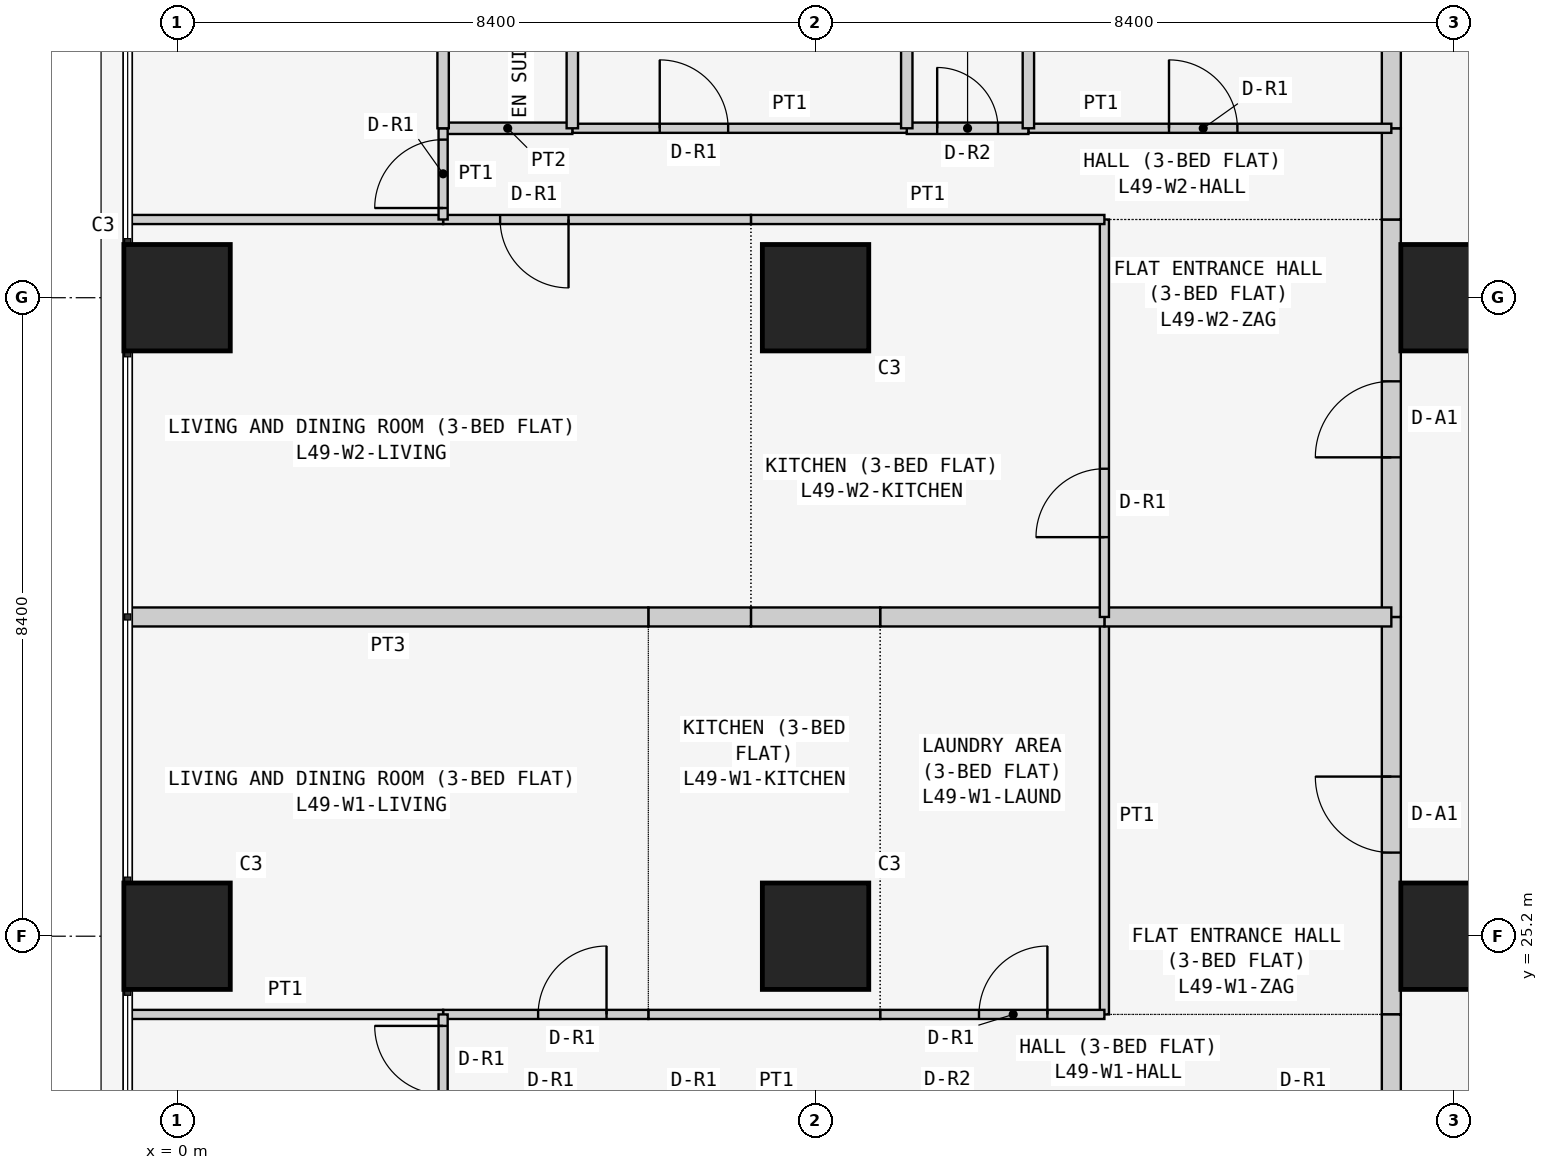
"""IFC4 building model, lengths in metres.
Left out: names, types, materials, properties, quantities, classifications, styles, units other than length and angle.
Written with IfcOpenShell. Run it as: python <this file> out.ifc"""

import sys

from ifc_helpers import new_model, si_unit, direction, frame, frame_2d, origin, origin_2d, place, context, subcontext, project, spatial, rectangle, extrude, element, fill, save


model = new_model("IFC4")
c1 = context("Model", 3, precision=1e-05, world=origin(), true_north=direction((0.0, 1.0)))
c2 = subcontext(c1, "Body", "Model", "MODEL_VIEW")
j1 = project(units=[si_unit("LENGTHUNIT", "METRE"), si_unit("PLANEANGLEUNIT", "RADIAN")], contexts=[c1])
p1 = place(None, origin())
s1 = spatial("IfcSite", under=j1, at=p1, CompositionType="ELEMENT")
p2 = place(p1, origin())
s2 = spatial("IfcBuilding", under=s1, at=p2, CompositionType="ELEMENT")
p3 = place(p2, frame((0.0, 0.0, 190.5)))
s3 = spatial("IfcBuildingStorey", under=s2, at=p3, CompositionType="ELEMENT", Elevation=190.5)
for number, where, z_axis, x_axis in (
    (1, (0.0, 25.2, 0.0), (0.0, 0.0, 1.0), (1.0, 0.0, 0.0)),
    (2, (0.0, 33.6, 0.0), (0.0, 0.0, 1.0), (1.0, 0.0, 0.0)),
    (3, (8.4, 25.2, 0.0), (0.0, 0.0, 1.0), (1.0, 0.0, 0.0)),
    (4, (8.4, 33.6, 0.0), (0.0, 0.0, 1.0), (1.0, 0.0, 0.0)),
    (5, (16.8, 25.2, 0.0), (0.0, 0.0, 1.0), (1.0, 0.0, 0.0)),
    (6, (16.8, 33.6, 0.0), (0.0, 0.0, 1.0), (1.0, 0.0, 0.0)),
):
    element("IfcColumn", number, at=place(p3, frame(where, z_axis=z_axis, x_axis=x_axis)), inside=s3, PredefinedType="COLUMN", context=c2, shape_type="SweptSolid", body=[
        extrude(rectangle(XDim=1.4, YDim=1.4, at=origin_2d()), origin(), (0.0, 0.0, 1.0), 3.6),
    ])
p4 = place(p3, frame((15.975, 24.171, 0.0), z_axis=(0.0, 0.0, 1.0), x_axis=(0.0, 1.0, 0.0)))
e7 = element("IfcWall", 7, at=p4, inside=s3, PredefinedType="PARTITIONING", context=c2, shape_type="SweptSolid", body=[
    extrude(rectangle(XDim=5.229, YDim=0.25, at=frame_2d((2.615, 0.0))), origin(), (0.0, 0.0, 1.0), 3.45),
])
p5 = place(p4, frame((2.129, 0.0, 0.0)))
e8 = element("IfcOpeningElement", 8, at=p5, cuts=e7, PredefinedType="OPENING", context=c2, shape_type="SweptSolid", body=[
    extrude(rectangle(XDim=1.0, YDim=2.1, at=frame_2d((0.5, 1.05))), frame((0.0, 0.135, 0.0), z_axis=(0.0, -1.0, 0.0), x_axis=(1.0, 0.0, 0.0)), (0.0, 0.0, 1.0), 0.27),
])
p6 = place(p3, frame((15.975, 22.971, 0.0), z_axis=(0.0, 0.0, 1.0), x_axis=(0.0, 1.0, 0.0)))
e9 = element("IfcWall", 9, at=p6, inside=s3, PredefinedType="PARTITIONING", context=c2, shape_type="SweptSolid", body=[
    extrude(rectangle(XDim=1.2, YDim=0.25, at=frame_2d((0.6, 0.0))), origin(), (0.0, 0.0, 1.0), 3.45),
])
p7 = place(p3, frame((15.975, 29.4, 0.0), z_axis=(0.0, 0.0, 1.0), x_axis=(0.0, 1.0, 0.0)))
e10 = element("IfcWall", 10, at=p7, inside=s3, PredefinedType="PARTITIONING", context=c2, shape_type="SweptSolid", body=[
    extrude(rectangle(XDim=5.229, YDim=0.25, at=frame_2d((2.615, 0.0))), origin(), (0.0, 0.0, 1.0), 3.45),
])
p8 = place(p7, frame((2.1, 0.0, 0.0)))
e11 = element("IfcOpeningElement", 11, at=p8, cuts=e10, PredefinedType="OPENING", context=c2, shape_type="SweptSolid", body=[
    extrude(rectangle(XDim=1.0, YDim=2.1, at=frame_2d((0.5, 1.05))), frame((0.0, 0.135, 0.0), z_axis=(0.0, -1.0, 0.0), x_axis=(1.0, 0.0, 0.0)), (0.0, 0.0, 1.0), 0.27),
])
p9 = place(p3, frame((15.975, 34.629, 0.0), z_axis=(0.0, 0.0, 1.0), x_axis=(0.0, 1.0, 0.0)))
e12 = element("IfcWall", 12, at=p9, inside=s3, PredefinedType="PARTITIONING", context=c2, shape_type="SweptSolid", body=[
    extrude(rectangle(XDim=1.2, YDim=0.25, at=frame_2d((0.6, 0.0))), origin(), (0.0, 0.0, 1.0), 3.45),
])
p10 = place(p3, frame((15.975, 35.829, 0.0), z_axis=(0.0, 0.0, 1.0), x_axis=(0.0, 1.0, 0.0)))
e13 = element("IfcWall", 13, at=p10, inside=s3, PredefinedType="PARTITIONING", context=c2, shape_type="SweptSolid", body=[
    extrude(rectangle(XDim=6.871, YDim=0.25, at=frame_2d((3.436, 0.0))), origin(), (0.0, 0.0, 1.0), 3.45),
])
p11 = place(p3, frame((12.2, 29.4, 0.0), z_axis=(0.0, 0.0, 1.0), x_axis=(0.0, -1.0, 0.0)))
e14 = element("IfcWall", 14, at=p11, inside=s3, PredefinedType="PARTITIONING", context=c2, shape_type="SweptSolid", body=[
    extrude(rectangle(XDim=5.229, YDim=0.12, at=frame_2d((2.615, 0.0))), origin(), (0.0, 0.0, 1.0), 3.45),
])
p12 = place(p3, frame((15.975, 29.4, 0.0), z_axis=(0.0, 0.0, 1.0), x_axis=(-1.0, 0.0, 0.0)))
e15 = element("IfcWall", 15, at=p12, inside=s3, PredefinedType="PARTITIONING", context=c2, shape_type="SweptSolid", body=[
    extrude(rectangle(XDim=3.775, YDim=0.25, at=frame_2d((1.888, 0.0))), origin(), (0.0, 0.0, 1.0), 3.45),
])
p13 = place(p3, frame((9.25, 24.171, 0.0), z_axis=(0.0, 0.0, 1.0), x_axis=(1.0, 0.0, 0.0)))
e16 = element("IfcWall", 16, at=p13, inside=s3, PredefinedType="PARTITIONING", context=c2, shape_type="SweptSolid", body=[
    extrude(rectangle(XDim=2.95, YDim=0.12, at=frame_2d((1.475, 0.0))), origin(), (0.0, 0.0, 1.0), 3.45),
])
p14 = place(p13, frame((1.3, 0.0, 0.0)))
e17 = element("IfcOpeningElement", 17, at=p14, cuts=e16, PredefinedType="OPENING", context=c2, shape_type="SweptSolid", body=[
    extrude(rectangle(XDim=0.9, YDim=2.1, at=frame_2d((0.45, 1.05))), frame((0.0, 0.07, 0.0), z_axis=(0.0, -1.0, 0.0), x_axis=(1.0, 0.0, 0.0)), (0.0, 0.0, 1.0), 0.14),
])
p15 = place(p3, frame((12.2, 29.4, 0.0), z_axis=(0.0, 0.0, 1.0), x_axis=(-1.0, 0.0, 0.0)))
e18 = element("IfcWall", 18, at=p15, inside=s3, PredefinedType="PARTITIONING", context=c2, shape_type="SweptSolid", body=[
    extrude(rectangle(XDim=2.95, YDim=0.25, at=frame_2d((1.475, 0.0))), origin(), (0.0, 0.0, 1.0), 3.45),
])
p16 = place(p3, frame((6.2, 24.171, 0.0), z_axis=(0.0, 0.0, 1.0), x_axis=(1.0, 0.0, 0.0)))
e19 = element("IfcWall", 19, at=p16, inside=s3, PredefinedType="PARTITIONING", context=c2, shape_type="SweptSolid", body=[
    extrude(rectangle(XDim=3.05, YDim=0.12, at=frame_2d((1.525, 0.0))), origin(), (0.0, 0.0, 1.0), 3.45),
])
p17 = place(p3, frame((9.25, 29.4, 0.0), z_axis=(0.0, 0.0, 1.0), x_axis=(-1.0, 0.0, 0.0)))
e20 = element("IfcWall", 20, at=p17, inside=s3, PredefinedType="PARTITIONING", context=c2, shape_type="SweptSolid", body=[
    extrude(rectangle(XDim=1.7, YDim=0.25, at=frame_2d((0.85, 0.0))), origin(), (0.0, 0.0, 1.0), 3.45),
])
p18 = place(p3, frame((7.55, 29.4, 0.0), z_axis=(0.0, 0.0, 1.0), x_axis=(-1.0, 0.0, 0.0)))
e21 = element("IfcWall", 21, at=p18, inside=s3, PredefinedType="PARTITIONING", context=c2, shape_type="SweptSolid", body=[
    extrude(rectangle(XDim=1.35, YDim=0.25, at=frame_2d((0.675, 0.0))), origin(), (0.0, 0.0, 1.0), 3.45),
])
p19 = place(p3, frame((3.5, 24.171, 0.0), z_axis=(0.0, 0.0, 1.0), x_axis=(1.0, 0.0, 0.0)))
e22 = element("IfcWall", 22, at=p19, inside=s3, PredefinedType="PARTITIONING", context=c2, shape_type="SweptSolid", body=[
    extrude(rectangle(XDim=2.7, YDim=0.12, at=frame_2d((1.35, 0.0))), origin(), (0.0, 0.0, 1.0), 3.45),
])
p20 = place(p19, frame((1.25, 0.0, 0.0)))
e23 = element("IfcOpeningElement", 23, at=p20, cuts=e22, PredefinedType="OPENING", context=c2, shape_type="SweptSolid", body=[
    extrude(rectangle(XDim=0.9, YDim=2.1, at=frame_2d((0.45, 1.05))), frame((0.0, 0.07, 0.0), z_axis=(0.0, -1.0, 0.0), x_axis=(1.0, 0.0, 0.0)), (0.0, 0.0, 1.0), 0.14),
])
p21 = place(p3, frame((-0.65, 24.171, 0.0), z_axis=(0.0, 0.0, 1.0), x_axis=(1.0, 0.0, 0.0)))
e24 = element("IfcWall", 24, at=p21, inside=s3, PredefinedType="PARTITIONING", context=c2, shape_type="SweptSolid", body=[
    extrude(rectangle(XDim=4.15, YDim=0.12, at=frame_2d((2.075, 0.0))), origin(), (0.0, 0.0, 1.0), 3.45),
])
p22 = place(p3, frame((6.2, 29.4, 0.0), z_axis=(0.0, 0.0, 1.0), x_axis=(-1.0, 0.0, 0.0)))
e25 = element("IfcWall", 25, at=p22, inside=s3, PredefinedType="PARTITIONING", context=c2, shape_type="SweptSolid", body=[
    extrude(rectangle(XDim=6.85, YDim=0.25, at=frame_2d((3.425, 0.0))), origin(), (0.0, 0.0, 1.0), 3.45),
])
p23 = place(p3, frame((3.5, 24.171, 0.0), z_axis=(0.0, 0.0, 1.0), x_axis=(0.0, -1.0, 0.0)))
e26 = element("IfcWall", 26, at=p23, inside=s3, PredefinedType="PARTITIONING", context=c2, shape_type="SweptSolid", body=[
    extrude(rectangle(XDim=1.2, YDim=0.12, at=frame_2d((0.6, 0.0))), origin(), (0.0, 0.0, 1.0), 3.45),
])
p24 = place(p23, frame((0.151, 0.0, 0.0)))
e27 = element("IfcOpeningElement", 27, at=p24, cuts=e26, PredefinedType="OPENING", context=c2, shape_type="SweptSolid", body=[
    extrude(rectangle(XDim=0.9, YDim=2.1, at=frame_2d((0.45, 1.05))), frame((0.0, 0.07, 0.0), z_axis=(0.0, -1.0, 0.0), x_axis=(1.0, 0.0, 0.0)), (0.0, 0.0, 1.0), 0.14),
])
p25 = place(p3, frame((12.2, 29.4, 0.0), z_axis=(0.0, 0.0, 1.0), x_axis=(0.0, 1.0, 0.0)))
e28 = element("IfcWall", 28, at=p25, inside=s3, PredefinedType="PARTITIONING", context=c2, shape_type="SweptSolid", body=[
    extrude(rectangle(XDim=5.229, YDim=0.12, at=frame_2d((2.615, 0.0))), origin(), (0.0, 0.0, 1.0), 3.45),
])
p26 = place(p25, frame((1.05, 0.0, 0.0)))
e29 = element("IfcOpeningElement", 29, at=p26, cuts=e28, PredefinedType="OPENING", context=c2, shape_type="SweptSolid", body=[
    extrude(rectangle(XDim=0.9, YDim=2.1, at=frame_2d((0.45, 1.05))), frame((0.0, 0.07, 0.0), z_axis=(0.0, -1.0, 0.0), x_axis=(1.0, 0.0, 0.0)), (0.0, 0.0, 1.0), 0.14),
])
p27 = place(p3, frame((7.55, 34.629, 0.0), z_axis=(0.0, 0.0, 1.0), x_axis=(1.0, 0.0, 0.0)))
e30 = element("IfcWall", 30, at=p27, inside=s3, PredefinedType="PARTITIONING", context=c2, shape_type="SweptSolid", body=[
    extrude(rectangle(XDim=4.65, YDim=0.12, at=frame_2d((2.325, 0.0))), origin(), (0.0, 0.0, 1.0), 3.45),
])
p28 = place(p3, frame((3.5, 34.629, 0.0), z_axis=(0.0, 0.0, 1.0), x_axis=(1.0, 0.0, 0.0)))
e31 = element("IfcWall", 31, at=p28, inside=s3, PredefinedType="PARTITIONING", context=c2, shape_type="SweptSolid", body=[
    extrude(rectangle(XDim=4.05, YDim=0.12, at=frame_2d((2.025, 0.0))), origin(), (0.0, 0.0, 1.0), 3.45),
])
p29 = place(p28, frame((0.75, 0.0, 0.0)))
e32 = element("IfcOpeningElement", 32, at=p29, cuts=e31, PredefinedType="OPENING", context=c2, shape_type="SweptSolid", body=[
    extrude(rectangle(XDim=0.9, YDim=2.1, at=frame_2d((0.45, 1.05))), frame((0.0, 0.07, 0.0), z_axis=(0.0, -1.0, 0.0), x_axis=(1.0, 0.0, 0.0)), (0.0, 0.0, 1.0), 0.14),
])
p30 = place(p3, frame((-0.65, 34.629, 0.0), z_axis=(0.0, 0.0, 1.0), x_axis=(1.0, 0.0, 0.0)))
e33 = element("IfcWall", 33, at=p30, inside=s3, PredefinedType="PARTITIONING", context=c2, shape_type="SweptSolid", body=[
    extrude(rectangle(XDim=4.15, YDim=0.12, at=frame_2d((2.075, 0.0))), origin(), (0.0, 0.0, 1.0), 3.45),
])
p31 = place(p3, frame((11.2, 35.829, 0.0), z_axis=(0.0, 0.0, 1.0), x_axis=(1.0, 0.0, 0.0)))
e34 = element("IfcWall", 34, at=p31, inside=s3, PredefinedType="PARTITIONING", context=c2, shape_type="SweptSolid", body=[
    extrude(rectangle(XDim=4.775, YDim=0.12, at=frame_2d((2.388, 0.0))), origin(), (0.0, 0.0, 1.0), 3.45),
])
p32 = place(p31, frame((1.85, 0.0, 0.0)))
e35 = element("IfcOpeningElement", 35, at=p32, cuts=e34, PredefinedType="OPENING", context=c2, shape_type="SweptSolid", body=[
    extrude(rectangle(XDim=0.9, YDim=2.1, at=frame_2d((0.45, 1.05))), frame((0.0, 0.07, 0.0), z_axis=(0.0, -1.0, 0.0), x_axis=(1.0, 0.0, 0.0)), (0.0, 0.0, 1.0), 0.14),
])
p33 = place(p3, frame((9.6, 35.829, 0.0), z_axis=(0.0, 0.0, 1.0), x_axis=(1.0, 0.0, 0.0)))
e36 = element("IfcWall", 36, at=p33, inside=s3, PredefinedType="PARTITIONING", context=c2, shape_type="SweptSolid", body=[
    extrude(rectangle(XDim=1.6, YDim=0.15, at=frame_2d((0.8, 0.0))), origin(), (0.0, 0.0, 1.0), 3.45),
])
p34 = place(p33, frame((0.4, 0.0, 0.0)))
e37 = element("IfcOpeningElement", 37, at=p34, cuts=e36, PredefinedType="OPENING", context=c2, shape_type="SweptSolid", body=[
    extrude(rectangle(XDim=0.8, YDim=2.1, at=frame_2d((0.4, 1.05))), frame((0.0, 0.085, 0.0), z_axis=(0.0, -1.0, 0.0), x_axis=(1.0, 0.0, 0.0)), (0.0, 0.0, 1.0), 0.17),
])
p35 = place(p3, frame((5.2, 35.829, 0.0), z_axis=(0.0, 0.0, 1.0), x_axis=(1.0, 0.0, 0.0)))
e38 = element("IfcWall", 38, at=p35, inside=s3, PredefinedType="PARTITIONING", context=c2, shape_type="SweptSolid", body=[
    extrude(rectangle(XDim=4.4, YDim=0.12, at=frame_2d((2.2, 0.0))), origin(), (0.0, 0.0, 1.0), 3.45),
])
p36 = place(p35, frame((1.15, 0.0, 0.0)))
e39 = element("IfcOpeningElement", 39, at=p36, cuts=e38, PredefinedType="OPENING", context=c2, shape_type="SweptSolid", body=[
    extrude(rectangle(XDim=0.9, YDim=2.1, at=frame_2d((0.45, 1.05))), frame((0.0, 0.07, 0.0), z_axis=(0.0, -1.0, 0.0), x_axis=(1.0, 0.0, 0.0)), (0.0, 0.0, 1.0), 0.14),
])
p37 = place(p3, frame((3.5, 35.829, 0.0), z_axis=(0.0, 0.0, 1.0), x_axis=(1.0, 0.0, 0.0)))
e40 = element("IfcWall", 40, at=p37, inside=s3, PredefinedType="PARTITIONING", context=c2, shape_type="SweptSolid", body=[
    extrude(rectangle(XDim=1.7, YDim=0.15, at=frame_2d((0.85, 0.0))), origin(), (0.0, 0.0, 1.0), 3.45),
])
p38 = place(p3, frame((3.5, 34.629, 0.0), z_axis=(0.0, 0.0, 1.0), x_axis=(0.0, 1.0, 0.0)))
e41 = element("IfcWall", 41, at=p38, inside=s3, PredefinedType="PARTITIONING", context=c2, shape_type="SweptSolid", body=[
    extrude(rectangle(XDim=1.2, YDim=0.12, at=frame_2d((0.6, 0.0))), origin(), (0.0, 0.0, 1.0), 3.45),
])
p39 = place(p38, frame((0.151, 0.0, 0.0)))
e42 = element("IfcOpeningElement", 42, at=p39, cuts=e41, PredefinedType="OPENING", context=c2, shape_type="SweptSolid", body=[
    extrude(rectangle(XDim=0.9, YDim=2.1, at=frame_2d((0.45, 1.05))), frame((0.0, 0.07, 0.0), z_axis=(0.0, -1.0, 0.0), x_axis=(1.0, 0.0, 0.0)), (0.0, 0.0, 1.0), 0.14),
])
for number, where, z_axis, x_axis in (
    (43, (11.2, 35.829, 0.0), (0.0, 0.0, 1.0), (0.0, 1.0, 0.0)),
    (44, (9.6, 35.829, 0.0), (0.0, 0.0, 1.0), (0.0, 1.0, 0.0)),
    (45, (5.2, 35.829, 0.0), (0.0, 0.0, 1.0), (0.0, 1.0, 0.0)),
):
    element("IfcWall", number, at=place(p3, frame(where, z_axis=z_axis, x_axis=x_axis)), inside=s3, PredefinedType="PARTITIONING", context=c2, shape_type="SweptSolid", body=[
        extrude(rectangle(XDim=6.871, YDim=0.15, at=frame_2d((3.436, 0.0))), origin(), (0.0, 0.0, 1.0), 3.45),
    ])
p40 = place(p3, frame((3.5, 35.829, 0.0), z_axis=(0.0, 0.0, 1.0), x_axis=(0.0, 1.0, 0.0)))
e46 = element("IfcWall", 46, at=p40, inside=s3, PredefinedType="PARTITIONING", context=c2, shape_type="SweptSolid", body=[
    extrude(rectangle(XDim=6.871, YDim=0.15, at=frame_2d((3.436, 0.0))), origin(), (0.0, 0.0, 1.0), 3.45),
])
p41 = place(p40, frame((3.171, 0.0, 0.0)))
e47 = element("IfcOpeningElement", 47, at=p41, cuts=e46, PredefinedType="OPENING", context=c2, shape_type="SweptSolid", body=[
    extrude(rectangle(XDim=0.8, YDim=2.1, at=frame_2d((0.4, 1.05))), frame((0.0, 0.085, 0.0), z_axis=(0.0, -1.0, 0.0), x_axis=(1.0, 0.0, 0.0)), (0.0, 0.0, 1.0), 0.17),
])
p42 = place(p5, origin())
e48 = element("IfcDoor", 48, at=p42, inside=s3, OperationType="SINGLE_SWING_RIGHT", PredefinedType="DOOR", context=c2, shape_type="SweptSolid", body=[
    extrude(rectangle(XDim=1.0, YDim=2.1, at=frame_2d((0.5, 1.05))), frame((0.0, 0.025, 0.0), z_axis=(0.0, -1.0, 0.0), x_axis=(1.0, 0.0, 0.0)), (0.0, 0.0, 1.0), 0.05),
])
fill(e8, e48)
p43 = place(p14, origin())
e49 = element("IfcDoor", 49, at=p43, inside=s3, OperationType="SINGLE_SWING_RIGHT", PredefinedType="DOOR", context=c2, shape_type="SweptSolid", body=[
    extrude(rectangle(XDim=0.9, YDim=2.1, at=frame_2d((0.45, 1.05))), frame((0.0, 0.025, 0.0), z_axis=(0.0, -1.0, 0.0), x_axis=(1.0, 0.0, 0.0)), (0.0, 0.0, 1.0), 0.05),
])
fill(e17, e49)
p44 = place(p20, origin())
e50 = element("IfcDoor", 50, at=p44, inside=s3, OperationType="SINGLE_SWING_RIGHT", PredefinedType="DOOR", context=c2, shape_type="SweptSolid", body=[
    extrude(rectangle(XDim=0.9, YDim=2.1, at=frame_2d((0.45, 1.05))), frame((0.0, 0.025, 0.0), z_axis=(0.0, -1.0, 0.0), x_axis=(1.0, 0.0, 0.0)), (0.0, 0.0, 1.0), 0.05),
])
fill(e23, e50)
p45 = place(p24, frame((0.9, 0.0, 0.0), z_axis=(0.0, 0.0, 1.0), x_axis=(-1.0, 0.0, 0.0)))
e51 = element("IfcDoor", 51, at=p45, inside=s3, OperationType="SINGLE_SWING_RIGHT", PredefinedType="DOOR", context=c2, shape_type="SweptSolid", body=[
    extrude(rectangle(XDim=0.9, YDim=2.1, at=frame_2d((0.45, 1.05))), frame((0.0, 0.025, 0.0), z_axis=(0.0, -1.0, 0.0), x_axis=(1.0, 0.0, 0.0)), (0.0, 0.0, 1.0), 0.05),
])
fill(e27, e51)
p46 = place(p8, origin())
e52 = element("IfcDoor", 52, at=p46, inside=s3, OperationType="SINGLE_SWING_LEFT", PredefinedType="DOOR", context=c2, shape_type="SweptSolid", body=[
    extrude(rectangle(XDim=1.0, YDim=2.1, at=frame_2d((0.5, 1.05))), frame((0.0, 0.025, 0.0), z_axis=(0.0, -1.0, 0.0), x_axis=(1.0, 0.0, 0.0)), (0.0, 0.0, 1.0), 0.05),
])
fill(e11, e52)
p47 = place(p26, origin())
e53 = element("IfcDoor", 53, at=p47, inside=s3, OperationType="SINGLE_SWING_LEFT", PredefinedType="DOOR", context=c2, shape_type="SweptSolid", body=[
    extrude(rectangle(XDim=0.9, YDim=2.1, at=frame_2d((0.45, 1.05))), frame((0.0, 0.025, 0.0), z_axis=(0.0, -1.0, 0.0), x_axis=(1.0, 0.0, 0.0)), (0.0, 0.0, 1.0), 0.05),
])
fill(e29, e53)
p48 = place(p29, frame((0.9, 0.0, 0.0), z_axis=(0.0, 0.0, 1.0), x_axis=(-1.0, 0.0, 0.0)))
e54 = element("IfcDoor", 54, at=p48, inside=s3, OperationType="SINGLE_SWING_LEFT", PredefinedType="DOOR", context=c2, shape_type="SweptSolid", body=[
    extrude(rectangle(XDim=0.9, YDim=2.1, at=frame_2d((0.45, 1.05))), frame((0.0, 0.025, 0.0), z_axis=(0.0, -1.0, 0.0), x_axis=(1.0, 0.0, 0.0)), (0.0, 0.0, 1.0), 0.05),
])
fill(e32, e54)
p49 = place(p32, origin())
e55 = element("IfcDoor", 55, at=p49, inside=s3, OperationType="SINGLE_SWING_LEFT", PredefinedType="DOOR", context=c2, shape_type="SweptSolid", body=[
    extrude(rectangle(XDim=0.9, YDim=2.1, at=frame_2d((0.45, 1.05))), frame((0.0, 0.025, 0.0), z_axis=(0.0, -1.0, 0.0), x_axis=(1.0, 0.0, 0.0)), (0.0, 0.0, 1.0), 0.05),
])
fill(e35, e55)
p50 = place(p34, origin())
e56 = element("IfcDoor", 56, at=p50, inside=s3, OperationType="SINGLE_SWING_LEFT", PredefinedType="DOOR", context=c2, shape_type="SweptSolid", body=[
    extrude(rectangle(XDim=0.8, YDim=2.1, at=frame_2d((0.4, 1.05))), frame((0.0, 0.025, 0.0), z_axis=(0.0, -1.0, 0.0), x_axis=(1.0, 0.0, 0.0)), (0.0, 0.0, 1.0), 0.05),
])
fill(e37, e56)
p51 = place(p36, origin())
e57 = element("IfcDoor", 57, at=p51, inside=s3, OperationType="SINGLE_SWING_LEFT", PredefinedType="DOOR", context=c2, shape_type="SweptSolid", body=[
    extrude(rectangle(XDim=0.9, YDim=2.1, at=frame_2d((0.45, 1.05))), frame((0.0, 0.025, 0.0), z_axis=(0.0, -1.0, 0.0), x_axis=(1.0, 0.0, 0.0)), (0.0, 0.0, 1.0), 0.05),
])
fill(e39, e57)
p52 = place(p39, origin())
e58 = element("IfcDoor", 58, at=p52, inside=s3, OperationType="SINGLE_SWING_LEFT", PredefinedType="DOOR", context=c2, shape_type="SweptSolid", body=[
    extrude(rectangle(XDim=0.9, YDim=2.1, at=frame_2d((0.45, 1.05))), frame((0.0, 0.025, 0.0), z_axis=(0.0, -1.0, 0.0), x_axis=(1.0, 0.0, 0.0)), (0.0, 0.0, 1.0), 0.05),
])
fill(e42, e58)
save(model, sys.argv[1])
